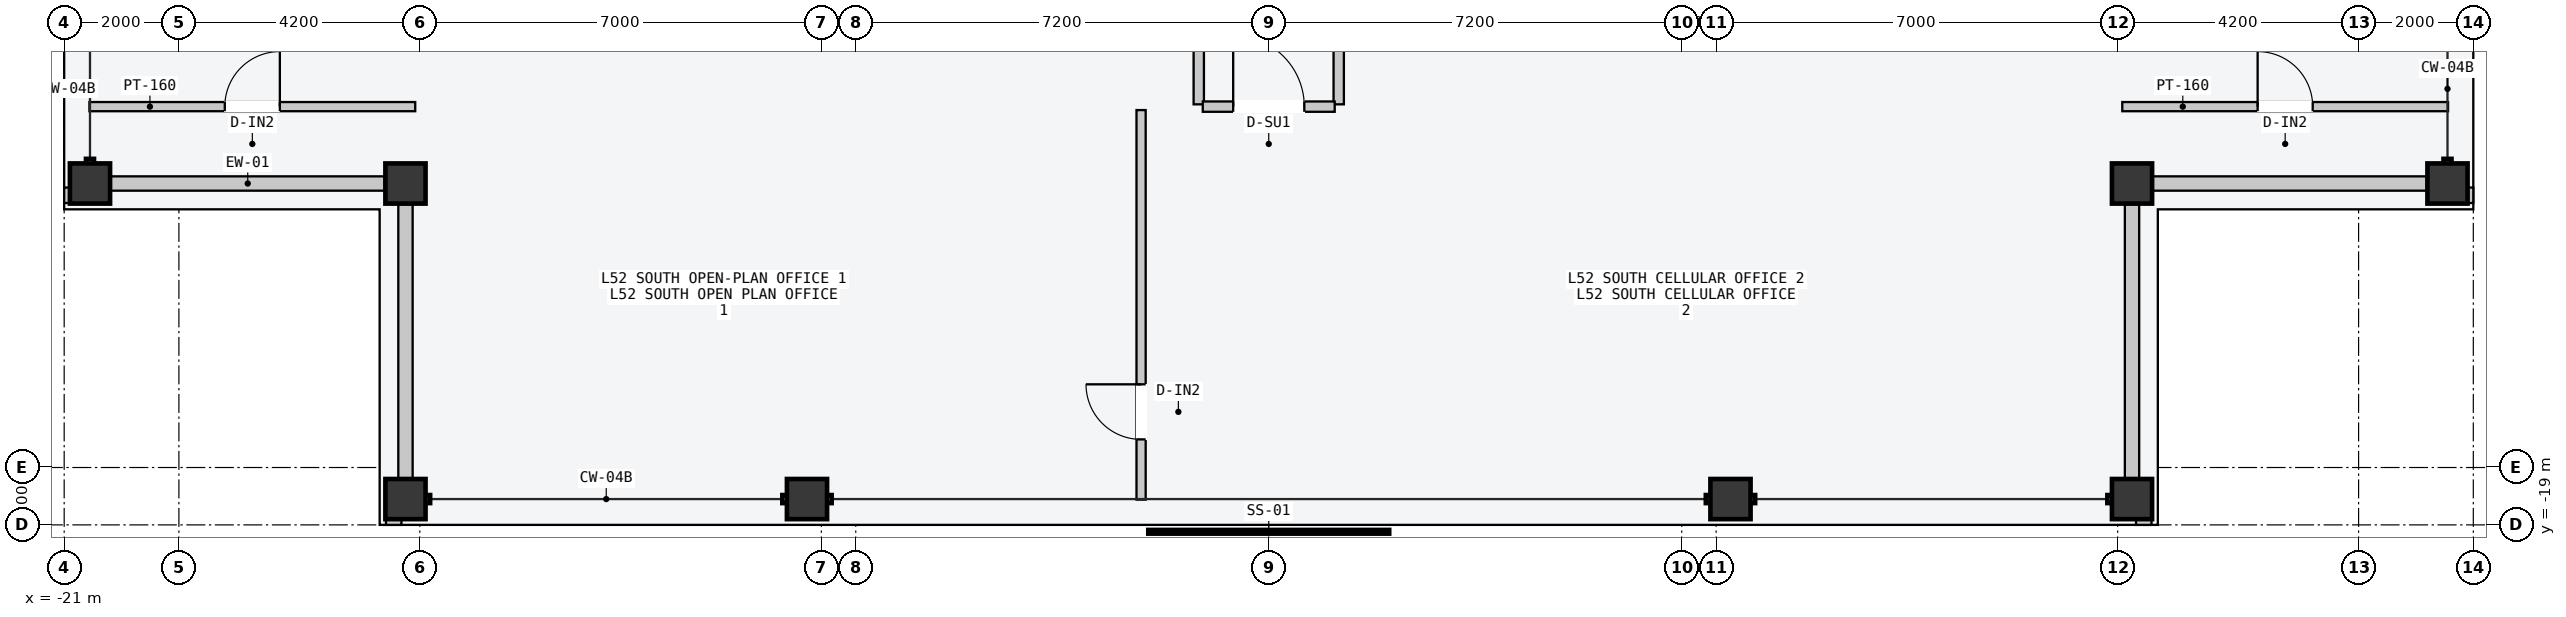
"""IFC4 building model, lengths in metres.
Left out: names, types, materials, properties, quantities, classifications, styles, units other than length and angle.
Written with IfcOpenShell. Run it as: python <this file> out.ifc"""

import sys

from ifc_helpers import new_model, si_unit, direction, frame, frame_2d, origin, origin_2d, place, context, subcontext, project, spatial, rectangle, hollow_rectangle, extrude, element, fill, save


model = new_model("IFC4")
c1 = context("Model", 3, precision=1e-05, world=origin(), true_north=direction((0.0, 1.0)))
c2 = subcontext(c1, "Body", "Model", "MODEL_VIEW")
j1 = project(units=[si_unit("LENGTHUNIT", "METRE"), si_unit("PLANEANGLEUNIT", "RADIAN")], contexts=[c1])
p1 = place(None, origin())
s1 = spatial("IfcSite", under=j1, at=p1, CompositionType="ELEMENT")
p2 = place(p1, origin())
s2 = spatial("IfcBuilding", under=s1, at=p2, CompositionType="ELEMENT")
p3 = place(p2, frame((0.0, 0.0, 198.3)))
s3 = spatial("IfcBuildingStorey", under=s2, at=p3, CompositionType="ELEMENT", Elevation=198.3)
for number, where, z_axis, x_axis in (
    (1, (-15.05, -18.55, 0.0), (0.0, 0.0, 1.0), (1.0, 0.0, 0.0)),
    (2, (-8.05, -18.55, 0.0), (0.0, 0.0, 1.0), (1.0, 0.0, 0.0)),
    (3, (8.05, -18.55, 0.0), (0.0, 0.0, 1.0), (1.0, 0.0, 0.0)),
    (4, (15.05, -18.55, 0.0), (0.0, 0.0, 1.0), (1.0, 0.0, 0.0)),
    (5, (-20.55, -13.05, 0.0), (0.0, 0.0, 1.0), (0.0, 1.0, 0.0)),
    (6, (20.55, -13.05, 0.0), (0.0, 0.0, 1.0), (0.0, 1.0, 0.0)),
    (7, (15.05, -13.05, 0.0), (0.0, 0.0, 1.0), (1.0, 0.0, 0.0)),
    (8, (-15.05, -13.05, 0.0), (0.0, 0.0, 1.0), (1.0, 0.0, 0.0)),
):
    element("IfcColumn", number, at=place(p3, frame(where, z_axis=z_axis, x_axis=x_axis)), inside=s3, PredefinedType="COLUMN", context=c2, shape_type="SweptSolid", body=[
        extrude(hollow_rectangle(XDim=0.7, YDim=0.7, WallThickness=0.03, at=origin_2d()), origin(), (0.0, 0.0, 1.0), 3.6),
    ])
for number, where, z_axis, x_axis in (
    (9, (-20.19, -13.05, 0.0), (0.0, 0.0, 1.0), (1.0, 0.0, 0.0)),
    (10, (-15.05, -18.19, 0.0), (0.0, 0.0, 1.0), (0.0, 1.0, 0.0)),
    (11, (15.41, -13.05, 0.0), (0.0, 0.0, 1.0), (1.0, 0.0, 0.0)),
    (12, (15.05, -18.19, 0.0), (0.0, 0.0, 1.0), (0.0, 1.0, 0.0)),
):
    element("IfcWall", number, at=place(p3, frame(where, z_axis=z_axis, x_axis=x_axis)), inside=s3, PredefinedType="STANDARD", context=c2, shape_type="SweptSolid", body=[
        extrude(rectangle(XDim=4.78, YDim=0.25, at=frame_2d((2.39, 0.0))), origin(), (0.0, 0.0, 1.0), 2.75),
    ])
for number, where, z_axis, x_axis in (
    (13, (-15.39, -18.89, 0.0), (0.0, 0.0, 1.0), (1.0, 0.0, 0.0)),
    (14, (-20.89, -13.39, 0.0), (0.0, 0.0, 1.0), (0.0, 1.0, 0.0)),
    (15, (15.12, -18.89, 0.0), (0.0, 0.0, 1.0), (1.0, 0.0, 0.0)),
    (16, (20.89, -13.39, 0.0), (0.0, 0.0, 1.0), (0.0, 1.0, 0.0)),
):
    element("IfcWall", number, at=place(p3, frame(where, z_axis=z_axis, x_axis=x_axis)), inside=s3, PredefinedType="PARAPET", context=c2, shape_type="SweptSolid", body=[
        extrude(rectangle(XDim=0.27, YDim=0.22, at=frame_2d((0.135, 0.0))), origin(), (0.0, 0.0, 1.0), 1.2),
    ])
p4 = place(p3, frame((-1.22, -11.67, 0.0), z_axis=(0.0, 0.0, 1.0), x_axis=(0.0, 1.0, 0.0)))
e17 = element("IfcWall", 17, at=p4, inside=s3, PredefinedType="PARTITIONING", context=c2, shape_type="SweptSolid", body=[
    extrude(rectangle(XDim=5.99, YDim=0.18, at=frame_2d((2.995, 0.0))), origin(), (0.0, 0.0, 1.0), 3.4),
])
p5 = place(p4, frame((1.15, 0.0, 0.0)))
e18 = element("IfcOpeningElement", 18, at=p5, cuts=e17, PredefinedType="OPENING", context=c2, shape_type="SweptSolid", body=[
    extrude(rectangle(XDim=0.96, YDim=2.18, at=frame_2d((0.48, 1.09))), frame((0.0, 0.1, 0.0), z_axis=(0.0, -1.0, 0.0), x_axis=(1.0, 0.0, 0.0)), (0.0, 0.0, 1.0), 0.2),
])
p6 = place(p3, frame((1.22, -11.67, 0.0), z_axis=(0.0, 0.0, 1.0), x_axis=(0.0, 1.0, 0.0)))
e19 = element("IfcWall", 19, at=p6, inside=s3, PredefinedType="PARTITIONING", context=c2, shape_type="SweptSolid", body=[
    extrude(rectangle(XDim=5.99, YDim=0.18, at=frame_2d((2.995, 0.0))), origin(), (0.0, 0.0, 1.0), 3.4),
])
p7 = place(p6, frame((1.15, 0.0, 0.0)))
e20 = element("IfcOpeningElement", 20, at=p7, cuts=e19, PredefinedType="OPENING", context=c2, shape_type="SweptSolid", body=[
    extrude(rectangle(XDim=0.96, YDim=2.18, at=frame_2d((0.48, 1.09))), frame((0.0, 0.1, 0.0), z_axis=(0.0, -1.0, 0.0), x_axis=(1.0, 0.0, 0.0)), (0.0, 0.0, 1.0), 0.2),
])
p8 = place(p3, frame((-2.226, -18.56, 0.0), z_axis=(0.0, 0.0, 1.0), x_axis=(0.0, 1.0, 0.0)))
e21 = element("IfcWall", 21, at=p8, inside=s3, PredefinedType="PARTITIONING", context=c2, shape_type="SweptSolid", body=[
    extrude(rectangle(XDim=6.79, YDim=0.16, at=frame_2d((3.395, 0.0))), origin(), (0.0, 0.0, 1.0), 3.4),
])
p9 = place(p8, frame((1.05, 0.0, 0.0)))
e22 = element("IfcOpeningElement", 22, at=p9, cuts=e21, PredefinedType="OPENING", context=c2, shape_type="SweptSolid", body=[
    extrude(rectangle(XDim=0.96, YDim=2.18, at=frame_2d((0.48, 1.09))), frame((0.0, 0.09, 0.0), z_axis=(0.0, -1.0, 0.0), x_axis=(1.0, 0.0, 0.0)), (0.0, 0.0, 1.0), 0.18),
])
p10 = place(p3, frame((-1.15, -11.71, 0.0), z_axis=(0.0, 0.0, 1.0), x_axis=(1.0, 0.0, 0.0)))
e23 = element("IfcWall", 23, at=p10, inside=s3, PredefinedType="PARTITIONING", context=c2, shape_type="SweptSolid", body=[
    extrude(rectangle(XDim=2.3, YDim=0.18, at=frame_2d((1.15, 0.0))), origin(), (0.0, 0.0, 1.0), 3.4),
])
p11 = place(p10, frame((0.53, 0.0, 0.0)))
e24 = element("IfcOpeningElement", 24, at=p11, cuts=e23, PredefinedType="OPENING", context=c2, shape_type="SweptSolid", body=[
    extrude(rectangle(XDim=1.24, YDim=2.24, at=frame_2d((0.62, 1.12))), frame((0.0, 0.1, 0.0), z_axis=(0.0, -1.0, 0.0), x_axis=(1.0, 0.0, 0.0)), (0.0, 0.0, 1.0), 0.2),
])
p12 = place(p3, frame((-20.56, -11.71, 0.0), z_axis=(0.0, 0.0, 1.0), x_axis=(1.0, 0.0, 0.0)))
e25 = element("IfcWall", 25, at=p12, inside=s3, PredefinedType="PARTITIONING", context=c2, shape_type="SweptSolid", body=[
    extrude(rectangle(XDim=5.68, YDim=0.16, at=frame_2d((2.84, 0.0))), origin(), (0.0, 0.0, 1.0), 3.4),
])
p13 = place(p12, frame((2.36, 0.0, 0.0)))
e26 = element("IfcOpeningElement", 26, at=p13, cuts=e25, PredefinedType="OPENING", context=c2, shape_type="SweptSolid", body=[
    extrude(rectangle(XDim=0.96, YDim=2.18, at=frame_2d((0.48, 1.09))), frame((0.0, 0.09, 0.0), z_axis=(0.0, -1.0, 0.0), x_axis=(1.0, 0.0, 0.0)), (0.0, 0.0, 1.0), 0.18),
])
p14 = place(p3, frame((14.88, -11.71, 0.0), z_axis=(0.0, 0.0, 1.0), x_axis=(1.0, 0.0, 0.0)))
e27 = element("IfcWall", 27, at=p14, inside=s3, PredefinedType="PARTITIONING", context=c2, shape_type="SweptSolid", body=[
    extrude(rectangle(XDim=5.68, YDim=0.16, at=frame_2d((2.84, 0.0))), origin(), (0.0, 0.0, 1.0), 3.4),
])
p15 = place(p14, frame((2.36, 0.0, 0.0)))
e28 = element("IfcOpeningElement", 28, at=p15, cuts=e27, PredefinedType="OPENING", context=c2, shape_type="SweptSolid", body=[
    extrude(rectangle(XDim=0.96, YDim=2.18, at=frame_2d((0.48, 1.09))), frame((0.0, 0.09, 0.0), z_axis=(0.0, -1.0, 0.0), x_axis=(1.0, 0.0, 0.0)), (0.0, 0.0, 1.0), 0.18),
])
p16 = place(p9, origin())
e29 = element("IfcDoor", 29, at=p16, inside=s3, OperationType="SINGLE_SWING_RIGHT", PredefinedType="DOOR", context=c2, shape_type="SweptSolid", body=[
    extrude(rectangle(XDim=0.96, YDim=2.18, at=frame_2d((0.48, 1.09))), frame((0.0, 0.025, 0.0), z_axis=(0.0, -1.0, 0.0), x_axis=(1.0, 0.0, 0.0)), (0.0, 0.0, 1.0), 0.05),
])
fill(e22, e29)
p17 = place(p11, origin())
e30 = element("IfcDoor", 30, at=p17, inside=s3, OperationType="SINGLE_SWING_LEFT", PredefinedType="DOOR", context=c2, shape_type="SweptSolid", body=[
    extrude(rectangle(XDim=1.24, YDim=2.24, at=frame_2d((0.62, 1.12))), frame((0.0, 0.025, 0.0), z_axis=(0.0, -1.0, 0.0), x_axis=(1.0, 0.0, 0.0)), (0.0, 0.0, 1.0), 0.05),
])
fill(e24, e30)
p18 = place(p13, origin())
e31 = element("IfcDoor", 31, at=p18, inside=s3, OperationType="SINGLE_SWING_RIGHT", PredefinedType="DOOR", context=c2, shape_type="SweptSolid", body=[
    extrude(rectangle(XDim=0.96, YDim=2.18, at=frame_2d((0.48, 1.09))), frame((0.0, 0.025, 0.0), z_axis=(0.0, -1.0, 0.0), x_axis=(1.0, 0.0, 0.0)), (0.0, 0.0, 1.0), 0.05),
])
fill(e26, e31)
p19 = place(p15, origin())
e32 = element("IfcDoor", 32, at=p19, inside=s3, OperationType="SINGLE_SWING_LEFT", PredefinedType="DOOR", context=c2, shape_type="SweptSolid", body=[
    extrude(rectangle(XDim=0.96, YDim=2.18, at=frame_2d((0.48, 1.09))), frame((0.0, 0.025, 0.0), z_axis=(0.0, -1.0, 0.0), x_axis=(1.0, 0.0, 0.0)), (0.0, 0.0, 1.0), 0.05),
])
fill(e28, e32)
save(model, sys.argv[1])
